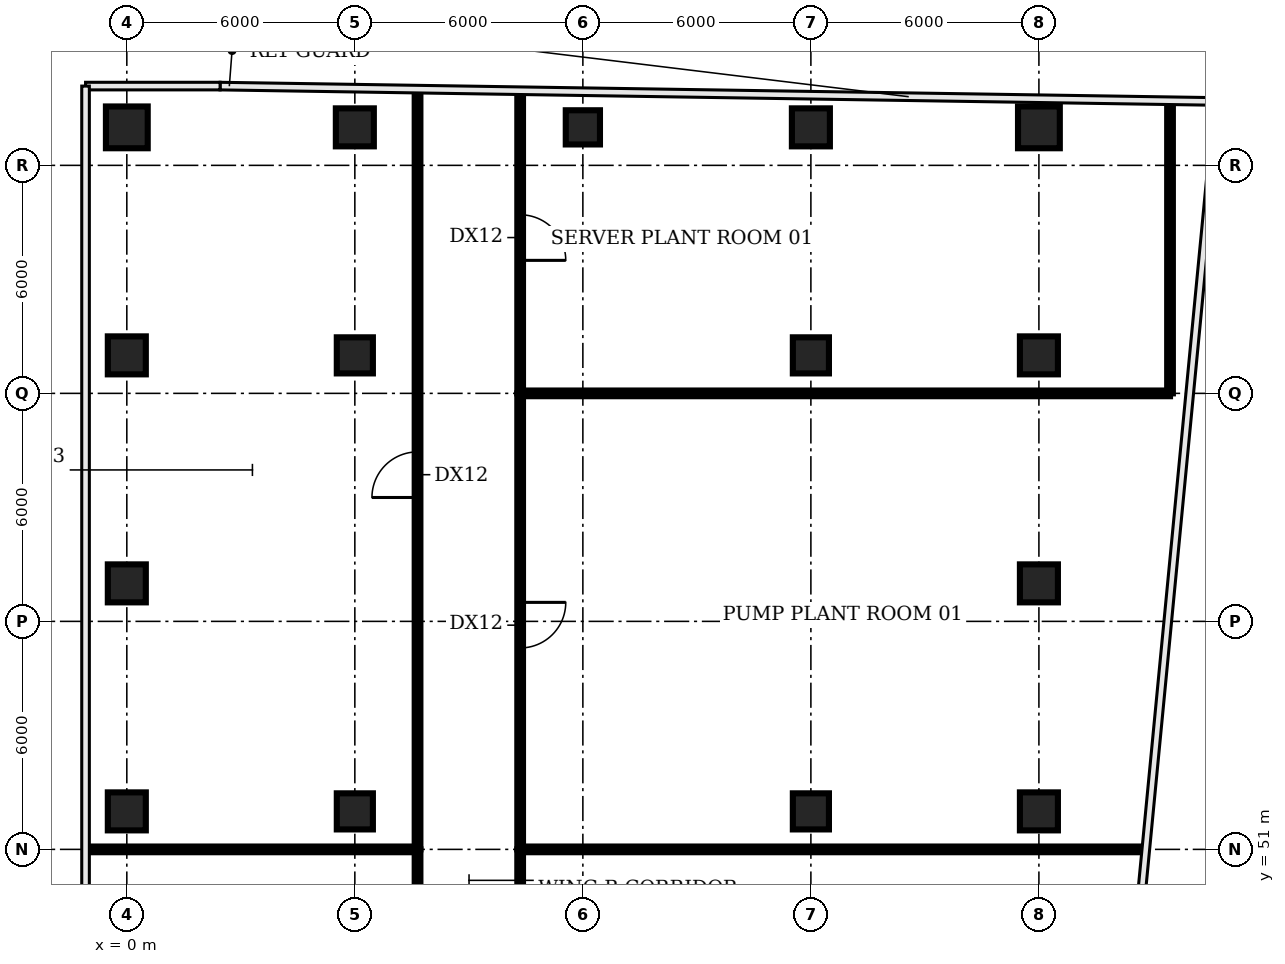
"""IFC4 building model, lengths in metres.
Left out: names, types, materials, properties, quantities, classifications, styles, units other than length and angle.
Written with IfcOpenShell. Run it as: python <this file> out.ifc"""

import sys

from ifc_helpers import new_model, si_unit, direction, frame, frame_2d, origin, origin_2d, place, context, subcontext, project, spatial, rectangle, circle, extrude, element, fill, save


model = new_model("IFC4")
c1 = context("Model", 3, precision=1e-05, world=origin(), true_north=direction((0.0, 1.0)))
c2 = subcontext(c1, "Body", "Model", "MODEL_VIEW")
j1 = project(units=[si_unit("LENGTHUNIT", "METRE"), si_unit("PLANEANGLEUNIT", "RADIAN")], contexts=[c1])
p1 = place(None, origin())
s1 = spatial("IfcSite", under=j1, at=p1, CompositionType="ELEMENT")
p2 = place(p1, origin())
s2 = spatial("IfcBuilding", under=s1, at=p2, CompositionType="ELEMENT")
p3 = place(p2, frame((0.0, 0.0, 134.0)))
s3 = spatial("IfcBuildingStorey", under=s2, at=p3, CompositionType="ELEMENT", Elevation=134.0)
for number, where, z_axis, x_axis in (
    (1, (0.0, 52.0, 0.0), (0.0, 0.0, 1.0), (1.0, 0.0, 0.0)),
    (2, (0.0, 58.0, 0.0), (0.0, 0.0, 1.0), (1.0, 0.0, 0.0)),
    (3, (0.0, 64.0, 0.0), (0.0, 0.0, 1.0), (1.0, 0.0, 0.0)),
):
    element("IfcColumn", number, at=place(p3, frame(where, z_axis=z_axis, x_axis=x_axis)), inside=s3, PredefinedType="COLUMN", context=c2, shape_type="SweptSolid", body=[
        extrude(rectangle(XDim=1.0, YDim=1.0, at=origin_2d()), origin(), (0.0, 0.0, 1.0), 3.2),
    ])
p4 = place(p3, frame((0.0, 70.0, 0.0), z_axis=(0.0, 0.0, 1.0), x_axis=(1.0, 0.0, 0.0)))
e4 = element("IfcColumn", 4, at=p4, inside=s3, PredefinedType="COLUMN", context=c2, shape_type="SweptSolid", body=[
    extrude(circle(Radius=0.55, at=origin_2d()), origin(), (0.0, 0.0, 1.0), 3.2),
])
for number, where, z_axis, x_axis in (
    (5, (6.0, 52.0, 0.0), (0.0, 0.0, 1.0), (1.0, 0.0, 0.0)),
    (6, (6.0, 64.0, 0.0), (0.0, 0.0, 1.0), (1.0, 0.0, 0.0)),
):
    element("IfcColumn", number, at=place(p3, frame(where, z_axis=z_axis, x_axis=x_axis)), inside=s3, PredefinedType="COLUMN", context=c2, shape_type="SweptSolid", body=[
        extrude(rectangle(XDim=0.95, YDim=0.95, at=origin_2d()), origin(), (0.0, 0.0, 1.0), 3.2),
    ])
p5 = place(p3, frame((6.0, 70.0, 0.0), z_axis=(0.0, 0.0, 1.0), x_axis=(1.0, 0.0, 0.0)))
e7 = element("IfcColumn", 7, at=p5, inside=s3, PredefinedType="COLUMN", context=c2, shape_type="SweptSolid", body=[
    extrude(rectangle(XDim=1.0, YDim=1.0, at=origin_2d()), origin(), (0.0, 0.0, 1.0), 3.2),
])
p6 = place(p3, frame((12.0, 70.0, 0.0), z_axis=(0.0, 0.0, 1.0), x_axis=(1.0, 0.0, 0.0)))
e8 = element("IfcColumn", 8, at=p6, inside=s3, PredefinedType="COLUMN", context=c2, shape_type="SweptSolid", body=[
    extrude(rectangle(XDim=0.9, YDim=0.9, at=origin_2d()), origin(), (0.0, 0.0, 1.0), 3.8),
])
for number, where, z_axis, x_axis in (
    (9, (18.0, 52.0, 0.0), (0.0, 0.0, 1.0), (1.0, 0.0, 0.0)),
    (10, (18.0, 64.0, 0.0), (0.0, 0.0, 1.0), (1.0, 0.0, 0.0)),
):
    element("IfcColumn", number, at=place(p3, frame(where, z_axis=z_axis, x_axis=x_axis)), inside=s3, PredefinedType="COLUMN", context=c2, shape_type="SweptSolid", body=[
        extrude(rectangle(XDim=0.95, YDim=0.95, at=origin_2d()), origin(), (0.0, 0.0, 1.0), 3.2),
    ])
for number, where, z_axis, x_axis in (
    (11, (18.0, 70.0, 0.0), (0.0, 0.0, 1.0), (1.0, 0.0, 0.0)),
    (12, (24.0, 52.0, 0.0), (0.0, 0.0, 1.0), (1.0, 0.0, 0.0)),
    (13, (24.0, 58.0, 0.0), (0.0, 0.0, 1.0), (1.0, 0.0, 0.0)),
    (14, (24.0, 64.0, 0.0), (0.0, 0.0, 1.0), (1.0, 0.0, 0.0)),
):
    element("IfcColumn", number, at=place(p3, frame(where, z_axis=z_axis, x_axis=x_axis)), inside=s3, PredefinedType="COLUMN", context=c2, shape_type="SweptSolid", body=[
        extrude(rectangle(XDim=1.0, YDim=1.0, at=origin_2d()), origin(), (0.0, 0.0, 1.0), 3.2),
    ])
p7 = place(p3, frame((24.0, 70.0, 0.0), z_axis=(0.0, 0.0, 1.0), x_axis=(1.0, 0.0, 0.0)))
e15 = element("IfcColumn", 15, at=p7, inside=s3, PredefinedType="COLUMN", context=c2, shape_type="SweptSolid", body=[
    extrude(circle(Radius=0.55, at=origin_2d()), origin(), (0.0, 0.0, 1.0), 3.2),
])
p8 = place(p3, frame((-1.04, 51.0, 0.0), z_axis=(0.0, 0.0, 1.0), x_axis=(1.0, 0.0, 0.0)))
e16 = element("IfcWall", 16, at=p8, inside=s3, PredefinedType="PARTITIONING", context=c2, shape_type="SweptSolid", body=[
    extrude(rectangle(XDim=8.69, YDim=0.15, at=frame_2d((4.345, 0.0))), origin(), (0.0, 0.0, 1.0), 2.78),
])
p9 = place(p3, frame((7.65, 39.0, 0.0), z_axis=(0.0, 0.0, 1.0), x_axis=(0.0, 1.0, 0.0)))
e17 = element("IfcWall", 17, at=p9, inside=s3, PredefinedType="PARTITIONING", context=c2, shape_type="SweptSolid", body=[
    extrude(rectangle(XDim=12.0, YDim=0.15, at=frame_2d((6.0, 0.0))), origin(), (0.0, 0.0, 1.0), 2.78),
])
p10 = place(p9, frame((5.5, 0.0, 0.0)))
e18 = element("IfcOpeningElement", 18, at=p10, cuts=e17, PredefinedType="OPENING", context=c2, shape_type="SweptSolid", body=[
    extrude(rectangle(XDim=1.2, YDim=2.1, at=frame_2d((0.6, 1.05))), frame((0.0, 0.085, 0.0), z_axis=(0.0, -1.0, 0.0), x_axis=(1.0, 0.0, 0.0)), (0.0, 0.0, 1.0), 0.17),
])
p11 = place(p3, frame((7.65, 51.0, 0.0), z_axis=(0.0, 0.0, 1.0), x_axis=(0.0, 1.0, 0.0)))
e19 = element("IfcWall", 19, at=p11, inside=s3, PredefinedType="PARTITIONING", context=c2, shape_type="SweptSolid", body=[
    extrude(rectangle(XDim=19.96, YDim=0.15, at=frame_2d((9.98, 0.0))), origin(), (0.0, 0.0, 1.0), 2.78),
])
p12 = place(p11, frame((9.26, 0.0, 0.0)))
e20 = element("IfcOpeningElement", 20, at=p12, cuts=e19, PredefinedType="OPENING", context=c2, shape_type="SweptSolid", body=[
    extrude(rectangle(XDim=1.2, YDim=2.1, at=frame_2d((0.6, 1.05))), frame((0.0, 0.085, 0.0), z_axis=(0.0, -1.0, 0.0), x_axis=(1.0, 0.0, 0.0)), (0.0, 0.0, 1.0), 0.17),
])
p13 = place(p3, frame((10.35, 51.0, 0.0), z_axis=(0.0, 0.0, 1.0), x_axis=(0.0, -1.0, 0.0)))
e21 = element("IfcWall", 21, at=p13, inside=s3, PredefinedType="PARTITIONING", context=c2, shape_type="SweptSolid", body=[
    extrude(rectangle(XDim=16.75, YDim=0.15, at=frame_2d((8.375, 0.0))), origin(), (0.0, 0.0, 1.0), 2.78),
])
p14 = place(p13, frame((7.85, 0.0, 0.0)))
e22 = element("IfcOpeningElement", 22, at=p14, cuts=e21, PredefinedType="OPENING", context=c2, shape_type="SweptSolid", body=[
    extrude(rectangle(XDim=1.2, YDim=2.1, at=frame_2d((0.6, 1.05))), frame((0.0, 0.085, 0.0), z_axis=(0.0, -1.0, 0.0), x_axis=(1.0, 0.0, 0.0)), (0.0, 0.0, 1.0), 0.17),
])
p15 = place(p3, frame((10.35, 51.0, 0.0), z_axis=(0.0, 0.0, 1.0), x_axis=(1.0, 0.0, 0.0)))
e23 = element("IfcWall", 23, at=p15, inside=s3, PredefinedType="PARTITIONING", context=c2, shape_type="SweptSolid", body=[
    extrude(rectangle(XDim=16.41, YDim=0.15, at=frame_2d((8.205, 0.0))), origin(), (0.0, 0.0, 1.0), 2.78),
])
p16 = place(p3, frame((10.35, 63.0, 0.0), z_axis=(0.0, 0.0, 1.0), x_axis=(0.0, -1.0, 0.0)))
e24 = element("IfcWall", 24, at=p16, inside=s3, PredefinedType="PARTITIONING", context=c2, shape_type="SweptSolid", body=[
    extrude(rectangle(XDim=12.0, YDim=0.15, at=frame_2d((6.0, 0.0))), origin(), (0.0, 0.0, 1.0), 2.78),
])
p17 = place(p16, frame((5.5, 0.0, 0.0)))
e25 = element("IfcOpeningElement", 25, at=p17, cuts=e24, PredefinedType="OPENING", context=c2, shape_type="SweptSolid", body=[
    extrude(rectangle(XDim=1.2, YDim=2.1, at=frame_2d((0.6, 1.05))), frame((0.0, 0.085, 0.0), z_axis=(0.0, -1.0, 0.0), x_axis=(1.0, 0.0, 0.0)), (0.0, 0.0, 1.0), 0.17),
])
p18 = place(p3, frame((10.35, 63.0, 0.0), z_axis=(0.0, 0.0, 1.0), x_axis=(1.0, 0.0, 0.0)))
e26 = element("IfcWall", 26, at=p18, inside=s3, PredefinedType="PARTITIONING", context=c2, shape_type="SweptSolid", body=[
    extrude(rectangle(XDim=17.1, YDim=0.15, at=frame_2d((8.55, 0.0))), origin(), (0.0, 0.0, 1.0), 2.78),
])
p19 = place(p3, frame((10.35, 70.91, 0.0), z_axis=(0.0, 0.0, 1.0), x_axis=(0.0, -1.0, 0.0)))
e27 = element("IfcWall", 27, at=p19, inside=s3, PredefinedType="PARTITIONING", context=c2, shape_type="SweptSolid", body=[
    extrude(rectangle(XDim=7.91, YDim=0.15, at=frame_2d((3.955, 0.0))), origin(), (0.0, 0.0, 1.0), 2.78),
])
p20 = place(p19, frame((3.21, 0.0, 0.0)))
e28 = element("IfcOpeningElement", 28, at=p20, cuts=e27, PredefinedType="OPENING", context=c2, shape_type="SweptSolid", body=[
    extrude(rectangle(XDim=1.2, YDim=2.1, at=frame_2d((0.6, 1.05))), frame((0.0, 0.085, 0.0), z_axis=(0.0, -1.0, 0.0), x_axis=(1.0, 0.0, 0.0)), (0.0, 0.0, 1.0), 0.17),
])
p21 = place(p3, frame((27.45, 63.0, 0.0), z_axis=(0.0, 0.0, 1.0), x_axis=(0.0, 1.0, 0.0)))
e29 = element("IfcWall", 29, at=p21, inside=s3, PredefinedType="PARTITIONING", context=c2, shape_type="SweptSolid", body=[
    extrude(rectangle(XDim=7.65, YDim=0.15, at=frame_2d((3.825, 0.0))), origin(), (0.0, 0.0, 1.0), 2.78),
])
p22 = place(p12, origin())
e30 = element("IfcDoor", 30, at=p22, inside=s3, OperationType="SINGLE_SWING_LEFT", PredefinedType="DOOR", context=c2, shape_type="SweptSolid", body=[
    extrude(rectangle(XDim=1.2, YDim=2.1, at=frame_2d((0.6, 1.05))), frame((0.0, 0.025, 0.0), z_axis=(0.0, -1.0, 0.0), x_axis=(1.0, 0.0, 0.0)), (0.0, 0.0, 1.0), 0.05),
])
fill(e20, e30)
p23 = place(p17, origin())
e31 = element("IfcDoor", 31, at=p23, inside=s3, OperationType="SINGLE_SWING_LEFT", PredefinedType="DOOR", context=c2, shape_type="SweptSolid", body=[
    extrude(rectangle(XDim=1.2, YDim=2.1, at=frame_2d((0.6, 1.05))), frame((0.0, 0.025, 0.0), z_axis=(0.0, -1.0, 0.0), x_axis=(1.0, 0.0, 0.0)), (0.0, 0.0, 1.0), 0.05),
])
fill(e25, e31)
p24 = place(p20, origin())
e32 = element("IfcDoor", 32, at=p24, inside=s3, OperationType="SINGLE_SWING_RIGHT", PredefinedType="DOOR", context=c2, shape_type="SweptSolid", body=[
    extrude(rectangle(XDim=1.2, YDim=2.1, at=frame_2d((0.6, 1.05))), frame((0.0, 0.025, 0.0), z_axis=(0.0, -1.0, 0.0), x_axis=(1.0, 0.0, 0.0)), (0.0, 0.0, 1.0), 0.05),
])
fill(e28, e32)
save(model, sys.argv[1])
